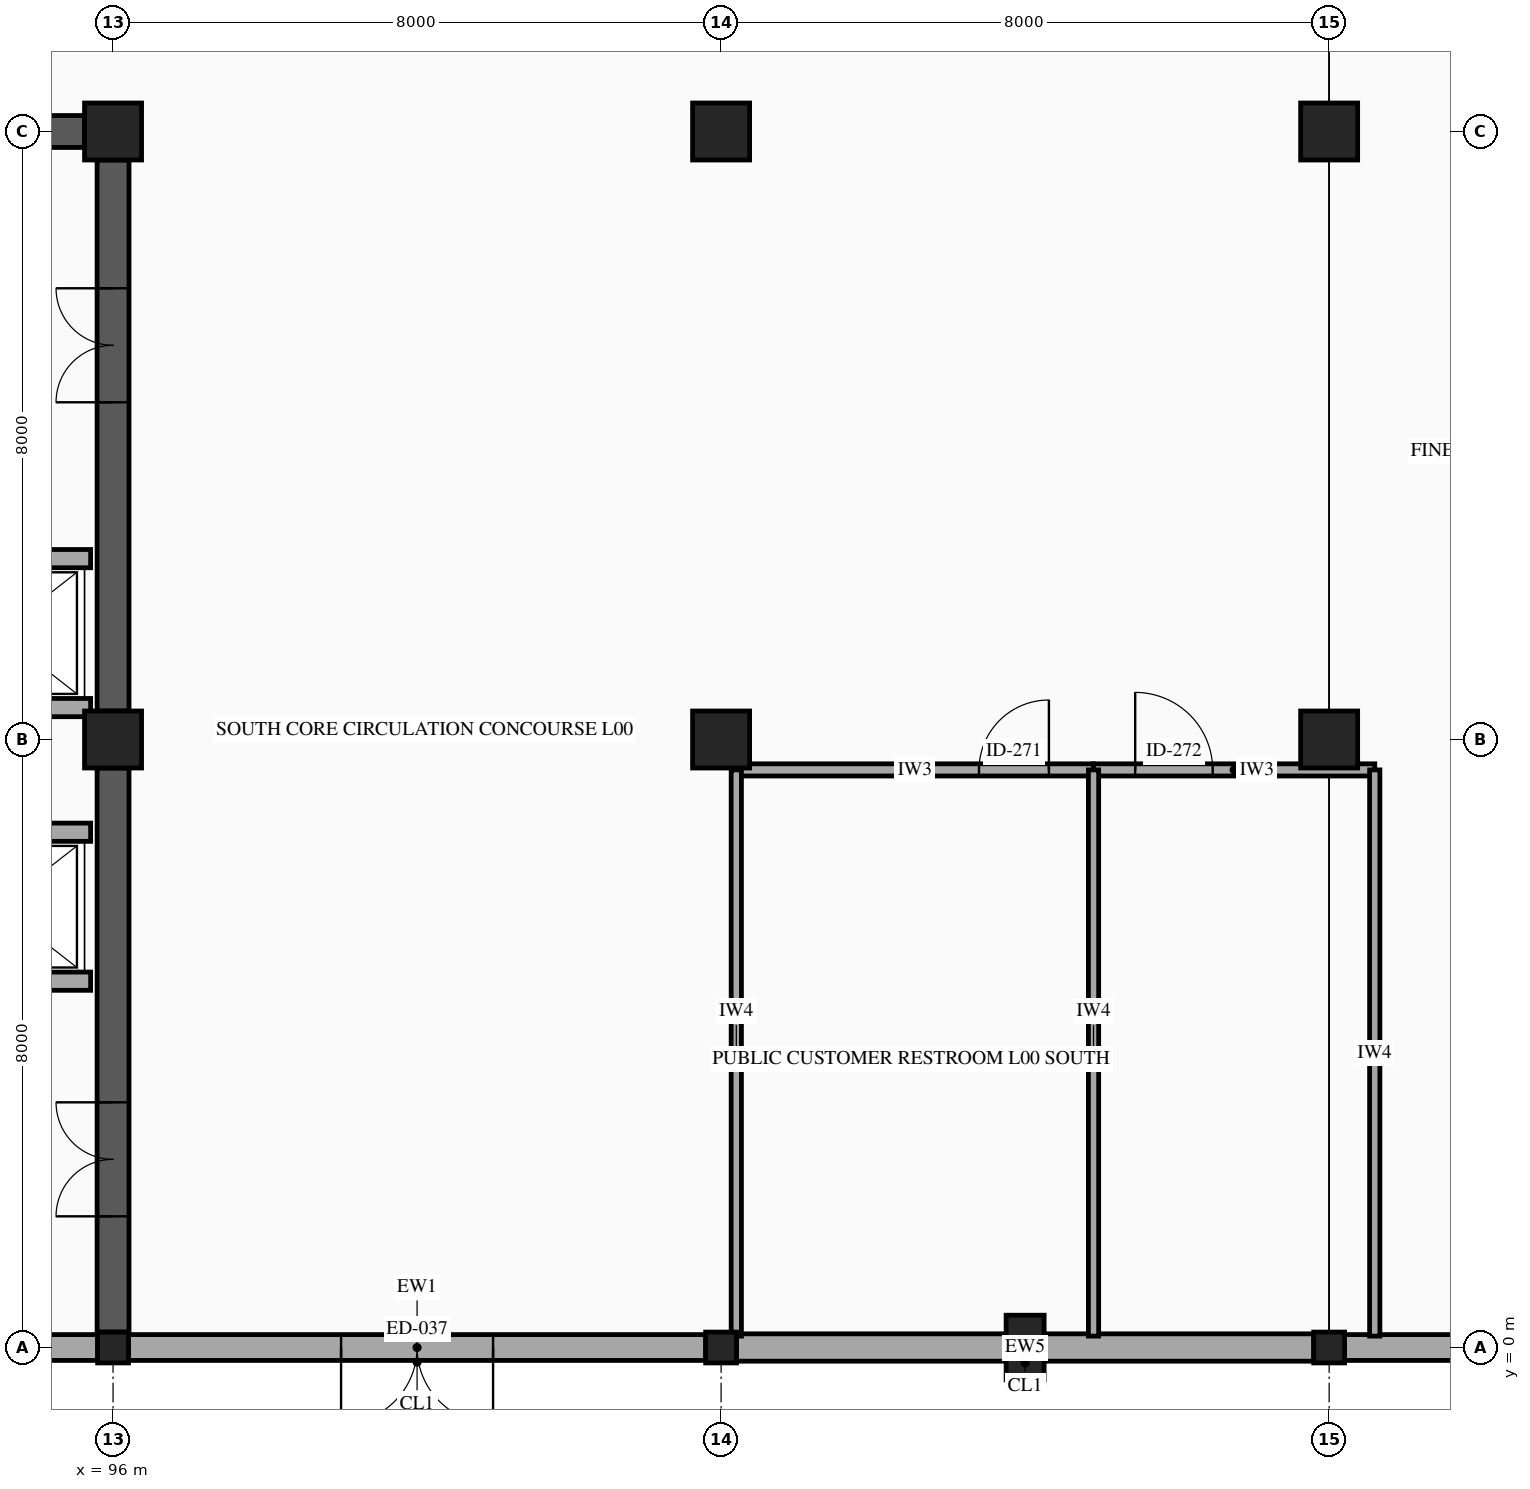
"""IFC4 building model, lengths in metres.
Left out: names, types, materials, properties, quantities, classifications, styles, units other than length and angle.
Written with IfcOpenShell. Run it as: python <this file> out.ifc"""

import sys

from ifc_helpers import new_model, si_unit, direction, frame, frame_2d, origin, origin_2d, place, context, subcontext, project, spatial, rectangle, hollow_rectangle, extrude, element, fill, save


model = new_model("IFC4")
c1 = context("Model", 3, precision=1e-05, world=origin(), true_north=direction((0.0, 1.0)))
c2 = subcontext(c1, "Body", "Model", "MODEL_VIEW")
j1 = project(units=[si_unit("LENGTHUNIT", "METRE"), si_unit("PLANEANGLEUNIT", "RADIAN")], contexts=[c1])
p1 = place(None, origin())
s1 = spatial("IfcSite", under=j1, at=p1, CompositionType="ELEMENT")
p2 = place(p1, origin())
s2 = spatial("IfcBuilding", under=s1, at=p2, CompositionType="ELEMENT")
p3 = place(p2, origin())
s3 = spatial("IfcBuildingStorey", under=s2, at=p3, CompositionType="ELEMENT", Elevation=0.0)
p4 = place(p3, frame((96.0, 0.0, 0.0), z_axis=(0.0, 0.0, 1.0), x_axis=(1.0, 0.0, 0.0)))
e1 = element("IfcColumn", 1, at=p4, inside=s3, PredefinedType="COLUMN", context=c2, shape_type="SweptSolid", body=[
    extrude(hollow_rectangle(XDim=0.406, YDim=0.406, WallThickness=0.015, InnerFilletRadius=0.015, OuterFilletRadius=0.029, at=origin_2d()), origin(), (0.0, 0.0, 1.0), 5.6),
])
for number, where, z_axis, x_axis in (
    (2, (96.0, 8.0, 0.0), (0.0, 0.0, 1.0), (1.0, 0.0, 0.0)),
    (3, (96.0, 16.0, 0.0), (0.0, 0.0, 1.0), (1.0, 0.0, 0.0)),
):
    element("IfcColumn", number, at=place(p3, frame(where, z_axis=z_axis, x_axis=x_axis)), inside=s3, PredefinedType="COLUMN", context=c2, shape_type="SweptSolid", body=[
        extrude(rectangle(XDim=0.75, YDim=0.75, at=origin_2d()), origin(), (0.0, 0.0, 1.0), 5.6),
    ])
p5 = place(p3, frame((104.0, 0.0, 0.0), z_axis=(0.0, 0.0, 1.0), x_axis=(1.0, 0.0, 0.0)))
e4 = element("IfcColumn", 4, at=p5, inside=s3, PredefinedType="COLUMN", context=c2, shape_type="SweptSolid", body=[
    extrude(hollow_rectangle(XDim=0.406, YDim=0.406, WallThickness=0.015, InnerFilletRadius=0.015, OuterFilletRadius=0.029, at=origin_2d()), origin(), (0.0, 0.0, 1.0), 5.6),
])
for number, where, z_axis, x_axis in (
    (5, (104.0, 8.0, 0.0), (0.0, 0.0, 1.0), (1.0, 0.0, 0.0)),
    (6, (104.0, 16.0, 0.0), (0.0, 0.0, 1.0), (1.0, 0.0, 0.0)),
):
    element("IfcColumn", number, at=place(p3, frame(where, z_axis=z_axis, x_axis=x_axis)), inside=s3, PredefinedType="COLUMN", context=c2, shape_type="SweptSolid", body=[
        extrude(rectangle(XDim=0.75, YDim=0.75, at=origin_2d()), origin(), (0.0, 0.0, 1.0), 5.6),
    ])
p6 = place(p3, frame((112.0, 0.0, 0.0), z_axis=(0.0, 0.0, 1.0), x_axis=(1.0, 0.0, 0.0)))
e7 = element("IfcColumn", 7, at=p6, inside=s3, PredefinedType="COLUMN", context=c2, shape_type="SweptSolid", body=[
    extrude(hollow_rectangle(XDim=0.406, YDim=0.406, WallThickness=0.015, InnerFilletRadius=0.015, OuterFilletRadius=0.029, at=origin_2d()), origin(), (0.0, 0.0, 1.0), 5.6),
])
for number, where, z_axis, x_axis in (
    (8, (112.0, 8.0, 0.0), (0.0, 0.0, 1.0), (1.0, 0.0, 0.0)),
    (9, (112.0, 16.0, 0.0), (0.0, 0.0, 1.0), (1.0, 0.0, 0.0)),
):
    element("IfcColumn", number, at=place(p3, frame(where, z_axis=z_axis, x_axis=x_axis)), inside=s3, PredefinedType="COLUMN", context=c2, shape_type="SweptSolid", body=[
        extrude(rectangle(XDim=0.75, YDim=0.75, at=origin_2d()), origin(), (0.0, 0.0, 1.0), 5.6),
    ])
p7 = place(p3, frame((108.0, 0.0, 0.0), z_axis=(0.0, 0.0, 1.0), x_axis=(1.0, 0.0, 0.0)))
e10 = element("IfcColumn", 10, at=p7, inside=s3, PredefinedType="PILASTER", context=c2, shape_type="SweptSolid", body=[
    extrude(rectangle(XDim=0.5, YDim=0.85, at=origin_2d()), origin(), (0.0, 0.0, 1.0), 5.6),
])
p8 = place(p3, frame((119.797, 0.0, 0.0), z_axis=(0.0, 0.0, 1.0), x_axis=(-1.0, 0.0, 0.0)))
e11 = element("IfcWall", 11, at=p8, inside=s3, PredefinedType="STANDARD", context=c2, shape_type="SweptSolid", body=[
    extrude(rectangle(XDim=7.594, YDim=0.34, at=frame_2d((3.797, 0.0))), origin(), (0.0, 0.0, 1.0), 4.58),
])
p9 = place(p8, frame((2.697, 0.0, 0.0)))
e12 = element("IfcOpeningElement", 12, at=p9, cuts=e11, PredefinedType="OPENING", context=c2, shape_type="SweptSolid", body=[
    extrude(rectangle(XDim=2.2, YDim=2.45, at=frame_2d((1.1, 1.225))), frame((0.0, 0.18, 0.0), z_axis=(0.0, -1.0, 0.0), x_axis=(1.0, 0.0, 0.0)), (0.0, 0.0, 1.0), 0.36),
])
p10 = place(p3, frame((111.797, 0.0, 0.0), z_axis=(0.0, 0.0, 1.0), x_axis=(-1.0, 0.0, 0.0)))
e13 = element("IfcWall", 13, at=p10, inside=s3, PredefinedType="SOLIDWALL", context=c2, shape_type="SweptSolid", body=[
    extrude(rectangle(XDim=7.594, YDim=0.36, at=frame_2d((3.797, 0.0))), origin(), (0.0, 0.0, 1.0), 4.58),
])
p11 = place(p3, frame((103.797, 0.0, 0.0), z_axis=(0.0, 0.0, 1.0), x_axis=(-1.0, 0.0, 0.0)))
e14 = element("IfcWall", 14, at=p11, inside=s3, PredefinedType="STANDARD", context=c2, shape_type="SweptSolid", body=[
    extrude(rectangle(XDim=7.594, YDim=0.34, at=frame_2d((3.797, 0.0))), origin(), (0.0, 0.0, 1.0), 4.58),
])
p12 = place(p11, frame((2.797, 0.0, 0.0)))
e15 = element("IfcOpeningElement", 15, at=p12, cuts=e14, PredefinedType="OPENING", context=c2, shape_type="SweptSolid", body=[
    extrude(rectangle(XDim=2.0, YDim=2.35, at=frame_2d((1.0, 1.175))), frame((0.0, 0.18, 0.0), z_axis=(0.0, -1.0, 0.0), x_axis=(1.0, 0.0, 0.0)), (0.0, 0.0, 1.0), 0.36),
])
p13 = place(p3, frame((95.797, 0.0, 0.0), z_axis=(0.0, 0.0, 1.0), x_axis=(-1.0, 0.0, 0.0)))
e16 = element("IfcWall", 16, at=p13, inside=s3, PredefinedType="STANDARD", context=c2, shape_type="SweptSolid", body=[
    extrude(rectangle(XDim=7.594, YDim=0.34, at=frame_2d((3.797, 0.0))), origin(), (0.0, 0.0, 1.0), 4.58),
])
p14 = place(p13, frame((4.744, 0.0, 0.0)))
e17 = element("IfcOpeningElement", 17, at=p14, cuts=e16, PredefinedType="OPENING", context=c2, shape_type="SweptSolid", body=[
    extrude(rectangle(XDim=1.85, YDim=2.2, at=frame_2d((0.925, 1.1))), frame((0.0, 0.18, 0.0), z_axis=(0.0, -1.0, 0.0), x_axis=(1.0, 0.0, 0.0)), (0.0, 0.0, 1.0), 0.36),
])
p15 = place(p3, frame((88.375, 16.0, 0.0), z_axis=(0.0, 0.0, 1.0), x_axis=(1.0, 0.0, 0.0)))
e18 = element("IfcWall", 18, at=p15, inside=s3, PredefinedType="SHEAR", context=c2, shape_type="SweptSolid", body=[
    extrude(rectangle(XDim=7.25, YDim=0.42, at=frame_2d((3.625, 0.0))), origin(), (0.0, 0.0, 1.0), 5.38),
])
p16 = place(p15, frame((2.875, 0.0, 0.0)))
e19 = element("IfcOpeningElement", 19, at=p16, cuts=e18, PredefinedType="OPENING", context=c2, shape_type="SweptSolid", body=[
    extrude(rectangle(XDim=1.5, YDim=2.15, at=frame_2d((0.75, 1.075))), frame((0.0, 0.22, 0.0), z_axis=(0.0, -1.0, 0.0), x_axis=(1.0, 0.0, 0.0)), (0.0, 0.0, 1.0), 0.44),
])
p17 = place(p3, frame((96.0, 0.203, 0.0), z_axis=(0.0, 0.0, 1.0), x_axis=(0.0, 1.0, 0.0)))
e20 = element("IfcWall", 20, at=p17, inside=s3, PredefinedType="SHEAR", context=c2, shape_type="SweptSolid", body=[
    extrude(rectangle(XDim=7.422, YDim=0.42, at=frame_2d((3.711, 0.0))), origin(), (0.0, 0.0, 1.0), 5.38),
])
p18 = place(p17, frame((1.523, 0.0, 0.0)))
e21 = element("IfcOpeningElement", 21, at=p18, cuts=e20, PredefinedType="OPENING", context=c2, shape_type="SweptSolid", body=[
    extrude(rectangle(XDim=1.5, YDim=2.15, at=frame_2d((0.75, 1.075))), frame((0.0, 0.22, 0.0), z_axis=(0.0, -1.0, 0.0), x_axis=(1.0, 0.0, 0.0)), (0.0, 0.0, 1.0), 0.44),
])
p19 = place(p3, frame((96.0, 8.375, 0.0), z_axis=(0.0, 0.0, 1.0), x_axis=(0.0, 1.0, 0.0)))
e22 = element("IfcWall", 22, at=p19, inside=s3, PredefinedType="SHEAR", context=c2, shape_type="SweptSolid", body=[
    extrude(rectangle(XDim=7.25, YDim=0.42, at=frame_2d((3.625, 0.0))), origin(), (0.0, 0.0, 1.0), 5.38),
])
p20 = place(p19, frame((4.062, 0.0, 0.0)))
e23 = element("IfcOpeningElement", 23, at=p20, cuts=e22, PredefinedType="OPENING", context=c2, shape_type="SweptSolid", body=[
    extrude(rectangle(XDim=1.5, YDim=2.15, at=frame_2d((0.75, 1.075))), frame((0.0, 0.22, 0.0), z_axis=(0.0, -1.0, 0.0), x_axis=(1.0, 0.0, 0.0)), (0.0, 0.0, 1.0), 0.44),
])
p21 = place(p3, frame((93.295, 6.78, 0.0), z_axis=(0.0, 0.0, 1.0), x_axis=(1.0, 0.0, 0.0)))
e24 = element("IfcWall", 24, at=p21, inside=s3, PredefinedType="PARTITIONING", context=c2, shape_type="SweptSolid", body=[
    extrude(rectangle(XDim=2.41, YDim=0.24, at=frame_2d((1.205, 0.0))), origin(), (0.0, 0.0, 1.0), 5.38),
])
p22 = place(p21, frame((0.655, 0.0, 0.0)))
e25 = element("IfcOpeningElement", 25, at=p22, cuts=e24, PredefinedType="OPENING", context=c2, shape_type="SweptSolid", body=[
    extrude(rectangle(XDim=1.1, YDim=2.15, at=frame_2d((0.55, 1.075))), frame((0.0, 0.13, 0.0), z_axis=(0.0, -1.0, 0.0), x_axis=(1.0, 0.0, 0.0)), (0.0, 0.0, 1.0), 0.26),
])
p23 = place(p3, frame((93.295, 4.82, 0.0), z_axis=(0.0, 0.0, 1.0), x_axis=(1.0, 0.0, 0.0)))
e26 = element("IfcWall", 26, at=p23, inside=s3, PredefinedType="PARTITIONING", context=c2, shape_type="SweptSolid", body=[
    extrude(rectangle(XDim=2.41, YDim=0.24, at=frame_2d((1.205, 0.0))), origin(), (0.0, 0.0, 1.0), 5.38),
])
p24 = place(p3, frame((93.295, 10.38, 0.0), z_axis=(0.0, 0.0, 1.0), x_axis=(1.0, 0.0, 0.0)))
e27 = element("IfcWall", 27, at=p24, inside=s3, PredefinedType="PARTITIONING", context=c2, shape_type="SweptSolid", body=[
    extrude(rectangle(XDim=2.41, YDim=0.24, at=frame_2d((1.205, 0.0))), origin(), (0.0, 0.0, 1.0), 5.38),
])
p25 = place(p24, frame((0.655, 0.0, 0.0)))
e28 = element("IfcOpeningElement", 28, at=p25, cuts=e27, PredefinedType="OPENING", context=c2, shape_type="SweptSolid", body=[
    extrude(rectangle(XDim=1.1, YDim=2.15, at=frame_2d((0.55, 1.075))), frame((0.0, 0.13, 0.0), z_axis=(0.0, -1.0, 0.0), x_axis=(1.0, 0.0, 0.0)), (0.0, 0.0, 1.0), 0.26),
])
p26 = place(p3, frame((93.295, 8.42, 0.0), z_axis=(0.0, 0.0, 1.0), x_axis=(1.0, 0.0, 0.0)))
e29 = element("IfcWall", 29, at=p26, inside=s3, PredefinedType="PARTITIONING", context=c2, shape_type="SweptSolid", body=[
    extrude(rectangle(XDim=2.41, YDim=0.24, at=frame_2d((1.205, 0.0))), origin(), (0.0, 0.0, 1.0), 5.38),
])
p27 = place(p3, frame((104.2, 7.6, 0.0), z_axis=(0.0, 0.0, 1.0), x_axis=(1.0, 0.0, 0.0)))
e30 = element("IfcWall", 30, at=p27, inside=s3, PredefinedType="PARTITIONING", context=c2, shape_type="SweptSolid", body=[
    extrude(rectangle(XDim=4.7, YDim=0.16, at=frame_2d((2.35, 0.0))), origin(), (0.0, 0.0, 1.0), 4.58),
])
p28 = place(p27, frame((3.193, 0.0, 0.0)))
e31 = element("IfcOpeningElement", 31, at=p28, cuts=e30, PredefinedType="OPENING", context=c2, shape_type="SweptSolid", body=[
    extrude(rectangle(XDim=0.92, YDim=2.1, at=frame_2d((0.46, 1.05))), frame((0.0, 0.09, 0.0), z_axis=(0.0, -1.0, 0.0), x_axis=(1.0, 0.0, 0.0)), (0.0, 0.0, 1.0), 0.18),
])
p29 = place(p3, frame((108.9, 7.6, 0.0), z_axis=(0.0, 0.0, 1.0), x_axis=(1.0, 0.0, 0.0)))
e32 = element("IfcWall", 32, at=p29, inside=s3, PredefinedType="PARTITIONING", context=c2, shape_type="SweptSolid", body=[
    extrude(rectangle(XDim=3.7, YDim=0.16, at=frame_2d((1.85, 0.0))), origin(), (0.0, 0.0, 1.0), 4.58),
])
p30 = place(p29, frame((0.548, 0.0, 0.0)))
e33 = element("IfcOpeningElement", 33, at=p30, cuts=e32, PredefinedType="OPENING", context=c2, shape_type="SweptSolid", body=[
    extrude(rectangle(XDim=1.02, YDim=2.1, at=frame_2d((0.51, 1.05))), frame((0.0, 0.09, 0.0), z_axis=(0.0, -1.0, 0.0), x_axis=(1.0, 0.0, 0.0)), (0.0, 0.0, 1.0), 0.18),
])
for number, where, z_axis, x_axis in (
    (34, (104.2, 0.15, 0.0), (0.0, 0.0, 1.0), (0.0, 1.0, 0.0)),
    (35, (108.9, 0.15, 0.0), (0.0, 0.0, 1.0), (0.0, 1.0, 0.0)),
    (36, (112.6, 0.15, 0.0), (0.0, 0.0, 1.0), (0.0, 1.0, 0.0)),
):
    element("IfcWall", number, at=place(p3, frame(where, z_axis=z_axis, x_axis=x_axis)), inside=s3, PredefinedType="PARTITIONING", context=c2, shape_type="SweptSolid", body=[
        extrude(rectangle(XDim=7.45, YDim=0.135, at=frame_2d((3.725, 0.0))), origin(), (0.0, 0.0, 1.0), 4.58),
    ])
p31 = place(p12, origin())
e37 = element("IfcDoor", 37, at=p31, inside=s3, OperationType="DOUBLE_DOOR_SINGLE_SWING", PredefinedType="DOOR", context=c2, shape_type="SweptSolid", body=[
    extrude(rectangle(XDim=2.0, YDim=2.35, at=frame_2d((1.0, 1.175))), frame((0.0, 0.025, 0.0), z_axis=(0.0, -1.0, 0.0), x_axis=(1.0, 0.0, 0.0)), (0.0, 0.0, 1.0), 0.05),
])
fill(e15, e37)
p32 = place(p18, origin())
e38 = element("IfcDoor", 38, at=p32, inside=s3, OperationType="DOUBLE_DOOR_SINGLE_SWING", PredefinedType="DOOR", context=c2, shape_type="SweptSolid", body=[
    extrude(rectangle(XDim=1.5, YDim=2.15, at=frame_2d((0.75, 1.075))), frame((0.0, 0.025, 0.0), z_axis=(0.0, -1.0, 0.0), x_axis=(1.0, 0.0, 0.0)), (0.0, 0.0, 1.0), 0.05),
])
fill(e21, e38)
p33 = place(p20, origin())
e39 = element("IfcDoor", 39, at=p33, inside=s3, OperationType="DOUBLE_DOOR_SINGLE_SWING", PredefinedType="DOOR", context=c2, shape_type="SweptSolid", body=[
    extrude(rectangle(XDim=1.5, YDim=2.15, at=frame_2d((0.75, 1.075))), frame((0.0, 0.025, 0.0), z_axis=(0.0, -1.0, 0.0), x_axis=(1.0, 0.0, 0.0)), (0.0, 0.0, 1.0), 0.05),
])
fill(e23, e39)
p34 = place(p28, origin())
e40 = element("IfcDoor", 40, at=p34, inside=s3, OperationType="SINGLE_SWING_RIGHT", PredefinedType="DOOR", context=c2, shape_type="SweptSolid", body=[
    extrude(rectangle(XDim=0.92, YDim=2.1, at=frame_2d((0.46, 1.05))), frame((0.0, 0.025, 0.0), z_axis=(0.0, -1.0, 0.0), x_axis=(1.0, 0.0, 0.0)), (0.0, 0.0, 1.0), 0.05),
])
fill(e31, e40)
p35 = place(p30, origin())
e41 = element("IfcDoor", 41, at=p35, inside=s3, OperationType="SINGLE_SWING_LEFT", PredefinedType="DOOR", context=c2, shape_type="SweptSolid", body=[
    extrude(rectangle(XDim=1.02, YDim=2.1, at=frame_2d((0.51, 1.05))), frame((0.0, 0.025, 0.0), z_axis=(0.0, -1.0, 0.0), x_axis=(1.0, 0.0, 0.0)), (0.0, 0.0, 1.0), 0.05),
])
fill(e33, e41)
save(model, sys.argv[1])
